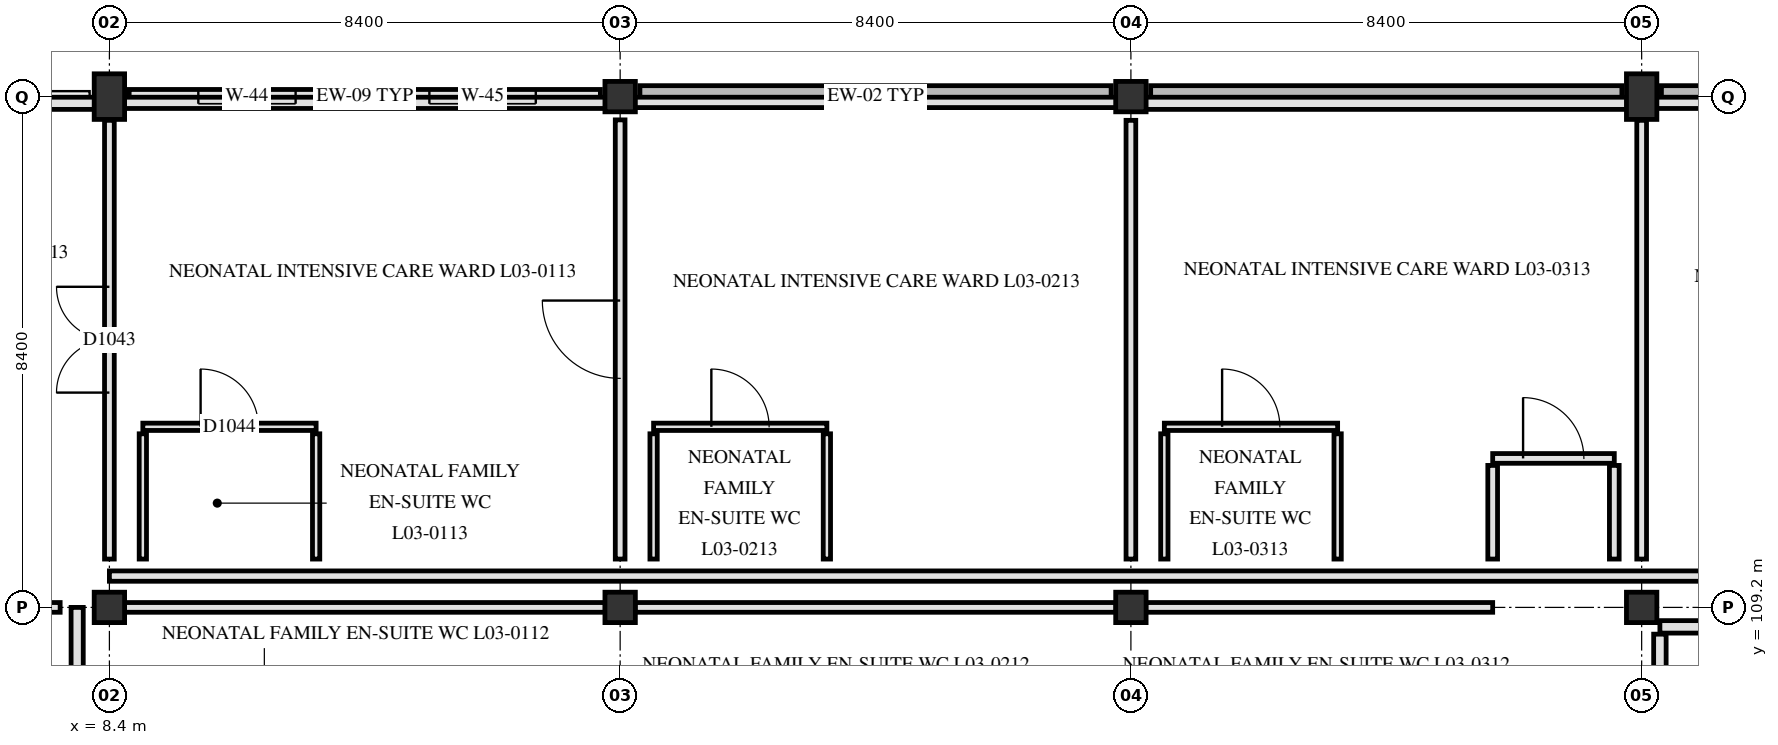
"""IFC4 building model, lengths in metres.
Left out: names, types, materials, properties, quantities, classifications, styles, units other than length and angle.
Written with IfcOpenShell. Run it as: python <this file> out.ifc"""

import sys

from ifc_helpers import new_model, si_unit, direction, frame, frame_2d, origin, origin_2d, place, context, subcontext, project, spatial, rectangle, extrude, element, fill, save


model = new_model("IFC4")
c1 = context("Model", 3, precision=1e-05, world=origin(), true_north=direction((0.0, 1.0)))
c2 = subcontext(c1, "Body", "Model", "MODEL_VIEW")
j1 = project(units=[si_unit("LENGTHUNIT", "METRE"), si_unit("PLANEANGLEUNIT", "RADIAN")], contexts=[c1])
p1 = place(None, origin())
s1 = spatial("IfcSite", under=j1, at=p1, CompositionType="ELEMENT")
p2 = place(p1, origin())
s2 = spatial("IfcBuilding", under=s1, at=p2, CompositionType="ELEMENT")
p3 = place(p2, frame((0.0, 0.0, 14.4)))
s3 = spatial("IfcBuildingStorey", under=s2, at=p3, CompositionType="ELEMENT", Elevation=14.4)
p4 = place(p3, frame((8.4, 109.2, 0.0), z_axis=(0.0, 0.0, 1.0), x_axis=(1.0, 0.0, 0.0)))
e1 = element("IfcColumn", 1, at=p4, inside=s3, PredefinedType="COLUMN", context=c2, shape_type="SweptSolid", body=[
    extrude(rectangle(XDim=0.5, YDim=0.5, at=origin_2d()), origin(), (0.0, 0.0, 1.0), 4.2),
])
p5 = place(p3, frame((8.4, 117.6, 0.0), z_axis=(0.0, 0.0, 1.0), x_axis=(1.0, 0.0, 0.0)))
e2 = element("IfcColumn", 2, at=p5, inside=s3, PredefinedType="PILASTER", context=c2, shape_type="SweptSolid", body=[
    extrude(rectangle(XDim=0.5, YDim=0.75, at=origin_2d()), origin(), (0.0, 0.0, 1.0), 4.2),
])
for number, where, z_axis, x_axis in (
    (3, (16.8, 109.2, 0.0), (0.0, 0.0, 1.0), (1.0, 0.0, 0.0)),
    (4, (16.8, 117.6, 0.0), (0.0, 0.0, 1.0), (1.0, 0.0, 0.0)),
    (5, (25.2, 109.2, 0.0), (0.0, 0.0, 1.0), (1.0, 0.0, 0.0)),
    (6, (25.2, 117.6, 0.0), (0.0, 0.0, 1.0), (1.0, 0.0, 0.0)),
    (7, (33.6, 109.2, 0.0), (0.0, 0.0, 1.0), (1.0, 0.0, 0.0)),
):
    element("IfcColumn", number, at=place(p3, frame(where, z_axis=z_axis, x_axis=x_axis)), inside=s3, PredefinedType="COLUMN", context=c2, shape_type="SweptSolid", body=[
        extrude(rectangle(XDim=0.5, YDim=0.5, at=origin_2d()), origin(), (0.0, 0.0, 1.0), 4.2),
    ])
p6 = place(p3, frame((33.6, 117.6, 0.0), z_axis=(0.0, 0.0, 1.0), x_axis=(1.0, 0.0, 0.0)))
e8 = element("IfcColumn", 8, at=p6, inside=s3, PredefinedType="PILASTER", context=c2, shape_type="SweptSolid", body=[
    extrude(rectangle(XDim=0.5, YDim=0.75, at=origin_2d()), origin(), (0.0, 0.0, 1.0), 4.2),
])
p7 = place(p3, frame((8.725, 117.6, 0.0), z_axis=(0.0, 0.0, 1.0), x_axis=(1.0, 0.0, 0.0)))
e9 = element("IfcWall", 9, at=p7, inside=s3, PredefinedType="SOLIDWALL", context=c2, shape_type="SweptSolid", body=[
    extrude(rectangle(XDim=7.75, YDim=0.235, at=frame_2d((3.875, 0.0))), origin(), (0.0, 0.0, 1.0), 3.19),
])
p8 = place(p7, frame((1.137, 0.0, 0.85)))
e10 = element("IfcOpeningElement", 10, at=p8, cuts=e9, PredefinedType="OPENING", context=c2, shape_type="SweptSolid", body=[
    extrude(rectangle(XDim=1.6, YDim=1.78, at=frame_2d((0.8, 0.89))), frame((0.0, 0.127, 0.0), z_axis=(0.0, -1.0, 0.0), x_axis=(1.0, 0.0, 0.0)), (0.0, 0.0, 1.0), 0.255),
])
p9 = place(p7, frame((4.938, 0.0, 0.85)))
e11 = element("IfcOpeningElement", 11, at=p9, cuts=e9, PredefinedType="OPENING", context=c2, shape_type="SweptSolid", body=[
    extrude(rectangle(XDim=1.75, YDim=1.78, at=frame_2d((0.875, 0.89))), frame((0.0, 0.127, 0.0), z_axis=(0.0, -1.0, 0.0), x_axis=(1.0, 0.0, 0.0)), (0.0, 0.0, 1.0), 0.255),
])
for number, where, z_axis, x_axis in (
    (12, (17.125, 117.6, 0.0), (0.0, 0.0, 1.0), (1.0, 0.0, 0.0)),
    (13, (25.525, 117.6, 0.0), (0.0, 0.0, 1.0), (1.0, 0.0, 0.0)),
    (14, (33.925, 117.6, 0.0), (0.0, 0.0, 1.0), (1.0, 0.0, 0.0)),
):
    element("IfcWall", number, at=place(p3, frame(where, z_axis=z_axis, x_axis=x_axis)), inside=s3, PredefinedType="SOLIDWALL", context=c2, shape_type="SweptSolid", body=[
        extrude(rectangle(XDim=7.75, YDim=0.36, at=frame_2d((3.875, 0.0))), origin(), (0.0, 0.0, 1.0), 3.9),
    ])
p10 = place(p3, frame((0.0, 117.49, 4.18), z_axis=(0.0, 0.0, 1.0), x_axis=(1.0, 0.0, 0.0)))
e15 = element("IfcWall", 15, at=p10, inside=s3, PredefinedType="PARAPET", context=c2, shape_type="SweptSolid", body=[
    extrude(rectangle(XDim=8.4, YDim=0.2, at=frame_2d((4.2, 0.0))), origin(), (0.0, 0.0, 1.0), 1.17),
])
p11 = place(p3, frame((8.4, 117.498, 4.18), z_axis=(0.0, 0.0, 1.0), x_axis=(1.0, 0.0, 0.0)))
e16 = element("IfcWall", 16, at=p11, inside=s3, PredefinedType="PARAPET", context=c2, shape_type="SweptSolid", body=[
    extrude(rectangle(XDim=8.4, YDim=0.185, at=frame_2d((4.2, 0.0))), origin(), (0.0, 0.0, 1.0), 1.17),
])
p12 = place(p3, frame((16.8, 117.505, 4.18), z_axis=(0.0, 0.0, 1.0), x_axis=(1.0, 0.0, 0.0)))
e17 = element("IfcWall", 17, at=p12, inside=s3, PredefinedType="PARAPET", context=c2, shape_type="SweptSolid", body=[
    extrude(rectangle(XDim=8.4, YDim=0.17, at=frame_2d((4.2, 0.0))), origin(), (0.0, 0.0, 1.0), 1.17),
])
p13 = place(p3, frame((25.2, 117.49, 4.18), z_axis=(0.0, 0.0, 1.0), x_axis=(1.0, 0.0, 0.0)))
e18 = element("IfcWall", 18, at=p13, inside=s3, PredefinedType="PARAPET", context=c2, shape_type="SweptSolid", body=[
    extrude(rectangle(XDim=8.4, YDim=0.2, at=frame_2d((4.2, 0.0))), origin(), (0.0, 0.0, 1.0), 1.17),
])
p14 = place(p3, frame((33.6, 117.498, 4.18), z_axis=(0.0, 0.0, 1.0), x_axis=(1.0, 0.0, 0.0)))
e19 = element("IfcWall", 19, at=p14, inside=s3, PredefinedType="PARAPET", context=c2, shape_type="SweptSolid", body=[
    extrude(rectangle(XDim=8.02, YDim=0.185, at=frame_2d((4.01, 0.0))), origin(), (0.0, 0.0, 1.0), 1.17),
])
p15 = place(p3, frame((41.62, 109.715, 4.18), z_axis=(0.0, 0.0, 1.0), x_axis=(-1.0, 0.0, 0.0)))
e20 = element("IfcWall", 20, at=p15, inside=s3, PredefinedType="PARAPET", context=c2, shape_type="SweptSolid", body=[
    extrude(rectangle(XDim=33.22, YDim=0.17, at=frame_2d((16.61, 0.0))), origin(), (0.0, 0.0, 1.0), 1.17),
])
p16 = place(p3, frame((7.87, 109.2, 4.18), z_axis=(0.0, 0.0, 1.0), x_axis=(0.0, -1.0, 0.0)))
e21 = element("IfcWall", 21, at=p16, inside=s3, PredefinedType="PARAPET", context=c2, shape_type="SweptSolid", body=[
    extrude(rectangle(XDim=50.4, YDim=0.2, at=frame_2d((25.2, 0.0))), origin(), (0.0, 0.0, 1.0), 1.17),
])
p17 = place(p3, frame((33.9, 104.64, 0.0), z_axis=(0.0, 0.0, 1.0), x_axis=(0.0, 1.0, 0.0)))
e22 = element("IfcWall", 22, at=p17, inside=s3, PredefinedType="PARTITIONING", context=c2, shape_type="SweptSolid", body=[
    extrude(rectangle(XDim=4.12, YDim=0.205, at=frame_2d((2.06, 0.0))), origin(), (0.0, 0.0, 1.0), 3.33),
])
p18 = place(p3, frame((33.9, 108.88, 0.0), z_axis=(0.0, 0.0, 1.0), x_axis=(1.0, 0.0, 0.0)))
e23 = element("IfcWall", 23, at=p18, inside=s3, PredefinedType="PARTITIONING", context=c2, shape_type="SweptSolid", body=[
    extrude(rectangle(XDim=4.18, YDim=0.205, at=frame_2d((2.09, 0.0))), origin(), (0.0, 0.0, 1.0), 3.28),
])
p19 = place(p18, frame((1.29, 0.0, 0.0)))
e24 = element("IfcOpeningElement", 24, at=p19, cuts=e23, PredefinedType="OPENING", context=c2, shape_type="SweptSolid", body=[
    extrude(rectangle(XDim=1.6, YDim=2.25, at=frame_2d((0.8, 1.125))), frame((0.0, 0.113, 0.0), z_axis=(0.0, -1.0, 0.0), x_axis=(1.0, 0.0, 0.0)), (0.0, 0.0, 1.0), 0.225),
])
p20 = place(p3, frame((0.39, 109.2, 0.0), z_axis=(0.0, 0.0, 1.0), x_axis=(1.0, 0.0, 0.0)))
e25 = element("IfcWall", 25, at=p20, inside=s3, PredefinedType="PARTITIONING", context=c2, shape_type="SweptSolid", body=[
    extrude(rectangle(XDim=7.2, YDim=0.16, at=frame_2d((3.6, 0.0))), origin(), (0.0, 0.0, 1.0), 3.29),
])
p21 = place(p20, frame((3.794, 0.0, 0.0)))
e26 = element("IfcOpeningElement", 26, at=p21, cuts=e25, PredefinedType="OPENING", context=c2, shape_type="SweptSolid", body=[
    extrude(rectangle(XDim=1.7, YDim=2.25, at=frame_2d((0.85, 1.125))), frame((0.0, 0.09, 0.0), z_axis=(0.0, -1.0, 0.0), x_axis=(1.0, 0.0, 0.0)), (0.0, 0.0, 1.0), 0.18),
])
p22 = place(p3, frame((8.645, 109.2, 0.0), z_axis=(0.0, 0.0, 1.0), x_axis=(1.0, 0.0, 0.0)))
e27 = element("IfcWall", 27, at=p22, inside=s3, PredefinedType="PARTITIONING", context=c2, shape_type="SweptSolid", body=[
    extrude(rectangle(XDim=7.91, YDim=0.16, at=frame_2d((3.955, 0.0))), origin(), (0.0, 0.0, 1.0), 3.28),
])
p23 = place(p3, frame((17.045, 109.2, 0.0), z_axis=(0.0, 0.0, 1.0), x_axis=(1.0, 0.0, 0.0)))
e28 = element("IfcWall", 28, at=p23, inside=s3, PredefinedType="PARTITIONING", context=c2, shape_type="SweptSolid", body=[
    extrude(rectangle(XDim=7.91, YDim=0.16, at=frame_2d((3.955, 0.0))), origin(), (0.0, 0.0, 1.0), 3.28),
])
p24 = place(p3, frame((25.445, 109.2, 0.0), z_axis=(0.0, 0.0, 1.0), x_axis=(1.0, 0.0, 0.0)))
e29 = element("IfcWall", 29, at=p24, inside=s3, PredefinedType="PARTITIONING", context=c2, shape_type="SweptSolid", body=[
    extrude(rectangle(XDim=5.705, YDim=0.16, at=frame_2d((2.853, 0.0))), origin(), (0.0, 0.0, 1.0), 3.28),
])
p25 = place(p3, frame((31.15, 111.65, 0.0), z_axis=(0.0, 0.0, 1.0), x_axis=(1.0, 0.0, 0.0)))
e30 = element("IfcWall", 30, at=p25, inside=s3, PredefinedType="PARTITIONING", context=c2, shape_type="SweptSolid", body=[
    extrude(rectangle(XDim=2.0, YDim=0.16, at=frame_2d((1.0, 0.0))), origin(), (0.0, 0.0, 1.0), 3.89),
])
p26 = place(p25, frame((0.5, 0.0, 0.0)))
e31 = element("IfcOpeningElement", 31, at=p26, cuts=e30, PredefinedType="OPENING", context=c2, shape_type="SweptSolid", body=[
    extrude(rectangle(XDim=1.0, YDim=2.15, at=frame_2d((0.5, 1.075))), frame((0.0, 0.09, 0.0), z_axis=(0.0, -1.0, 0.0), x_axis=(1.0, 0.0, 0.0)), (0.0, 0.0, 1.0), 0.18),
])
p27 = place(p3, frame((8.95, 112.17, 0.0), z_axis=(0.0, 0.0, 1.0), x_axis=(1.0, 0.0, 0.0)))
e32 = element("IfcWall", 32, at=p27, inside=s3, PredefinedType="PARTITIONING", context=c2, shape_type="SweptSolid", body=[
    extrude(rectangle(XDim=2.85, YDim=0.12, at=frame_2d((1.425, 0.0))), origin(), (0.0, 0.0, 1.0), 3.89),
])
p28 = place(p27, frame((0.95, 0.0, 0.0)))
e33 = element("IfcOpeningElement", 33, at=p28, cuts=e32, PredefinedType="OPENING", context=c2, shape_type="SweptSolid", body=[
    extrude(rectangle(XDim=0.95, YDim=2.1, at=frame_2d((0.475, 1.05))), frame((0.0, 0.07, 0.0), z_axis=(0.0, -1.0, 0.0), x_axis=(1.0, 0.0, 0.0)), (0.0, 0.0, 1.0), 0.14),
])
p29 = place(p3, frame((17.35, 112.17, 0.0), z_axis=(0.0, 0.0, 1.0), x_axis=(1.0, 0.0, 0.0)))
e34 = element("IfcWall", 34, at=p29, inside=s3, PredefinedType="PARTITIONING", context=c2, shape_type="SweptSolid", body=[
    extrude(rectangle(XDim=2.85, YDim=0.12, at=frame_2d((1.425, 0.0))), origin(), (0.0, 0.0, 1.0), 3.89),
])
p30 = place(p29, frame((0.95, 0.0, 0.0)))
e35 = element("IfcOpeningElement", 35, at=p30, cuts=e34, PredefinedType="OPENING", context=c2, shape_type="SweptSolid", body=[
    extrude(rectangle(XDim=0.95, YDim=2.1, at=frame_2d((0.475, 1.05))), frame((0.0, 0.07, 0.0), z_axis=(0.0, -1.0, 0.0), x_axis=(1.0, 0.0, 0.0)), (0.0, 0.0, 1.0), 0.14),
])
p31 = place(p3, frame((25.75, 112.17, 0.0), z_axis=(0.0, 0.0, 1.0), x_axis=(1.0, 0.0, 0.0)))
e36 = element("IfcWall", 36, at=p31, inside=s3, PredefinedType="PARTITIONING", context=c2, shape_type="SweptSolid", body=[
    extrude(rectangle(XDim=2.85, YDim=0.12, at=frame_2d((1.425, 0.0))), origin(), (0.0, 0.0, 1.0), 3.89),
])
p32 = place(p31, frame((0.95, 0.0, 0.0)))
e37 = element("IfcOpeningElement", 37, at=p32, cuts=e36, PredefinedType="OPENING", context=c2, shape_type="SweptSolid", body=[
    extrude(rectangle(XDim=0.95, YDim=2.1, at=frame_2d((0.475, 1.05))), frame((0.0, 0.07, 0.0), z_axis=(0.0, -1.0, 0.0), x_axis=(1.0, 0.0, 0.0)), (0.0, 0.0, 1.0), 0.14),
])
p33 = place(p3, frame((8.4, 109.995, 0.0), z_axis=(0.0, 0.0, 1.0), x_axis=(0.0, 1.0, 0.0)))
e38 = element("IfcWall", 38, at=p33, inside=s3, PredefinedType="PARTITIONING", context=c2, shape_type="SweptSolid", body=[
    extrude(rectangle(XDim=7.215, YDim=0.16, at=frame_2d((3.607, 0.0))), origin(), (0.0, 0.0, 1.0), 3.34),
])
p34 = place(p33, frame((2.738, 0.0, 0.0)))
e39 = element("IfcOpeningElement", 39, at=p34, cuts=e38, PredefinedType="OPENING", context=c2, shape_type="SweptSolid", body=[
    extrude(rectangle(XDim=1.74, YDim=2.24, at=frame_2d((0.87, 1.12))), frame((0.0, 0.09, 0.0), z_axis=(0.0, -1.0, 0.0), x_axis=(1.0, 0.0, 0.0)), (0.0, 0.0, 1.0), 0.18),
])
for number, where, z_axis, x_axis in (
    (40, (8.95, 109.995, 0.0), (0.0, 0.0, 1.0), (0.0, 1.0, 0.0)),
    (41, (11.8, 109.995, 0.0), (0.0, 0.0, 1.0), (0.0, 1.0, 0.0)),
):
    element("IfcWall", number, at=place(p3, frame(where, z_axis=z_axis, x_axis=x_axis)), inside=s3, PredefinedType="PARTITIONING", context=c2, shape_type="SweptSolid", body=[
        extrude(rectangle(XDim=2.06, YDim=0.12, at=frame_2d((1.03, 0.0))), origin(), (0.0, 0.0, 1.0), 3.89),
    ])
p35 = place(p3, frame((16.8, 109.995, 0.0), z_axis=(0.0, 0.0, 1.0), x_axis=(0.0, 1.0, 0.0)))
e42 = element("IfcWall", 42, at=p35, inside=s3, PredefinedType="PARTITIONING", context=c2, shape_type="SweptSolid", body=[
    extrude(rectangle(XDim=7.222, YDim=0.16, at=frame_2d((3.611, 0.0))), origin(), (0.0, 0.0, 1.0), 3.34),
])
p36 = place(p35, frame((2.971, 0.0, 0.0)))
e43 = element("IfcOpeningElement", 43, at=p36, cuts=e42, PredefinedType="OPENING", context=c2, shape_type="SweptSolid", body=[
    extrude(rectangle(XDim=1.28, YDim=2.18, at=frame_2d((0.64, 1.09))), frame((0.0, 0.09, 0.0), z_axis=(0.0, -1.0, 0.0), x_axis=(1.0, 0.0, 0.0)), (0.0, 0.0, 1.0), 0.18),
])
for number, where, z_axis, x_axis in (
    (44, (17.35, 109.995, 0.0), (0.0, 0.0, 1.0), (0.0, 1.0, 0.0)),
    (45, (20.2, 109.995, 0.0), (0.0, 0.0, 1.0), (0.0, 1.0, 0.0)),
):
    element("IfcWall", number, at=place(p3, frame(where, z_axis=z_axis, x_axis=x_axis)), inside=s3, PredefinedType="PARTITIONING", context=c2, shape_type="SweptSolid", body=[
        extrude(rectangle(XDim=2.06, YDim=0.12, at=frame_2d((1.03, 0.0))), origin(), (0.0, 0.0, 1.0), 3.89),
    ])
p37 = place(p3, frame((25.2, 109.995, 0.0), z_axis=(0.0, 0.0, 1.0), x_axis=(0.0, 1.0, 0.0)))
e46 = element("IfcWall", 46, at=p37, inside=s3, PredefinedType="PARTITIONING", context=c2, shape_type="SweptSolid", body=[
    extrude(rectangle(XDim=7.215, YDim=0.16, at=frame_2d((3.607, 0.0))), origin(), (0.0, 0.0, 1.0), 3.34),
])
for number, where, z_axis, x_axis in (
    (47, (25.75, 109.995, 0.0), (0.0, 0.0, 1.0), (0.0, 1.0, 0.0)),
    (48, (28.6, 109.995, 0.0), (0.0, 0.0, 1.0), (0.0, 1.0, 0.0)),
):
    element("IfcWall", number, at=place(p3, frame(where, z_axis=z_axis, x_axis=x_axis)), inside=s3, PredefinedType="PARTITIONING", context=c2, shape_type="SweptSolid", body=[
        extrude(rectangle(XDim=2.06, YDim=0.12, at=frame_2d((1.03, 0.0))), origin(), (0.0, 0.0, 1.0), 3.89),
    ])
for number, where, z_axis, x_axis in (
    (49, (31.15, 109.995, 0.0), (0.0, 0.0, 1.0), (0.0, 1.0, 0.0)),
    (50, (33.15, 109.995, 0.0), (0.0, 0.0, 1.0), (0.0, 1.0, 0.0)),
):
    element("IfcWall", number, at=place(p3, frame(where, z_axis=z_axis, x_axis=x_axis)), inside=s3, PredefinedType="PARTITIONING", context=c2, shape_type="SweptSolid", body=[
        extrude(rectangle(XDim=1.54, YDim=0.16, at=frame_2d((0.77, 0.0))), origin(), (0.0, 0.0, 1.0), 3.89),
    ])
p38 = place(p3, frame((33.6, 109.995, 0.0), z_axis=(0.0, 0.0, 1.0), x_axis=(0.0, 1.0, 0.0)))
e51 = element("IfcWall", 51, at=p38, inside=s3, PredefinedType="PARTITIONING", context=c2, shape_type="SweptSolid", body=[
    extrude(rectangle(XDim=7.215, YDim=0.16, at=frame_2d((3.607, 0.0))), origin(), (0.0, 0.0, 1.0), 3.34),
])
p39 = place(p8, origin())
e52 = element("IfcWindow", 52, at=p39, inside=s3, PartitioningType="SINGLE_PANEL", PredefinedType="WINDOW", context=c2, shape_type="SweptSolid", body=[
    extrude(rectangle(XDim=1.6, YDim=1.78, at=frame_2d((0.8, 0.89))), frame((0.0, 0.03, 0.0), z_axis=(0.0, -1.0, 0.0), x_axis=(1.0, 0.0, 0.0)), (0.0, 0.0, 1.0), 0.06),
])
fill(e10, e52)
p40 = place(p9, origin())
e53 = element("IfcWindow", 53, at=p40, inside=s3, PartitioningType="SINGLE_PANEL", PredefinedType="WINDOW", context=c2, shape_type="SweptSolid", body=[
    extrude(rectangle(XDim=1.75, YDim=1.78, at=frame_2d((0.875, 0.89))), frame((0.0, 0.03, 0.0), z_axis=(0.0, -1.0, 0.0), x_axis=(1.0, 0.0, 0.0)), (0.0, 0.0, 1.0), 0.06),
])
fill(e11, e53)
p41 = place(p34, origin())
e54 = element("IfcDoor", 54, at=p41, inside=s3, OperationType="DOUBLE_SWING_RIGHT", PredefinedType="DOOR", context=c2, shape_type="SweptSolid", body=[
    extrude(rectangle(XDim=1.74, YDim=2.24, at=frame_2d((0.87, 1.12))), frame((0.0, 0.025, 0.0), z_axis=(0.0, -1.0, 0.0), x_axis=(1.0, 0.0, 0.0)), (0.0, 0.0, 1.0), 0.05),
])
fill(e39, e54)
p42 = place(p28, origin())
e55 = element("IfcDoor", 55, at=p42, inside=s3, OperationType="SINGLE_SWING_LEFT", PredefinedType="DOOR", context=c2, shape_type="SweptSolid", body=[
    extrude(rectangle(XDim=0.95, YDim=2.1, at=frame_2d((0.475, 1.05))), frame((0.0, 0.025, 0.0), z_axis=(0.0, -1.0, 0.0), x_axis=(1.0, 0.0, 0.0)), (0.0, 0.0, 1.0), 0.05),
])
fill(e33, e55)
p43 = place(p36, origin())
e56 = element("IfcDoor", 56, at=p43, inside=s3, OperationType="SINGLE_SWING_RIGHT", PredefinedType="DOOR", context=c2, shape_type="SweptSolid", body=[
    extrude(rectangle(XDim=1.28, YDim=2.18, at=frame_2d((0.64, 1.09))), frame((0.0, 0.025, 0.0), z_axis=(0.0, -1.0, 0.0), x_axis=(1.0, 0.0, 0.0)), (0.0, 0.0, 1.0), 0.05),
])
fill(e43, e56)
p44 = place(p30, origin())
e57 = element("IfcDoor", 57, at=p44, inside=s3, OperationType="SINGLE_SWING_LEFT", PredefinedType="DOOR", context=c2, shape_type="SweptSolid", body=[
    extrude(rectangle(XDim=0.95, YDim=2.1, at=frame_2d((0.475, 1.05))), frame((0.0, 0.025, 0.0), z_axis=(0.0, -1.0, 0.0), x_axis=(1.0, 0.0, 0.0)), (0.0, 0.0, 1.0), 0.05),
])
fill(e35, e57)
p45 = place(p26, origin())
e58 = element("IfcDoor", 58, at=p45, inside=s3, OperationType="SINGLE_SWING_LEFT", PredefinedType="DOOR", context=c2, shape_type="SweptSolid", body=[
    extrude(rectangle(XDim=1.0, YDim=2.15, at=frame_2d((0.5, 1.075))), frame((0.0, 0.025, 0.0), z_axis=(0.0, -1.0, 0.0), x_axis=(1.0, 0.0, 0.0)), (0.0, 0.0, 1.0), 0.05),
])
fill(e31, e58)
p46 = place(p32, origin())
e59 = element("IfcDoor", 59, at=p46, inside=s3, OperationType="SINGLE_SWING_LEFT", PredefinedType="DOOR", context=c2, shape_type="SweptSolid", body=[
    extrude(rectangle(XDim=0.95, YDim=2.1, at=frame_2d((0.475, 1.05))), frame((0.0, 0.025, 0.0), z_axis=(0.0, -1.0, 0.0), x_axis=(1.0, 0.0, 0.0)), (0.0, 0.0, 1.0), 0.05),
])
fill(e37, e59)
save(model, sys.argv[1])
